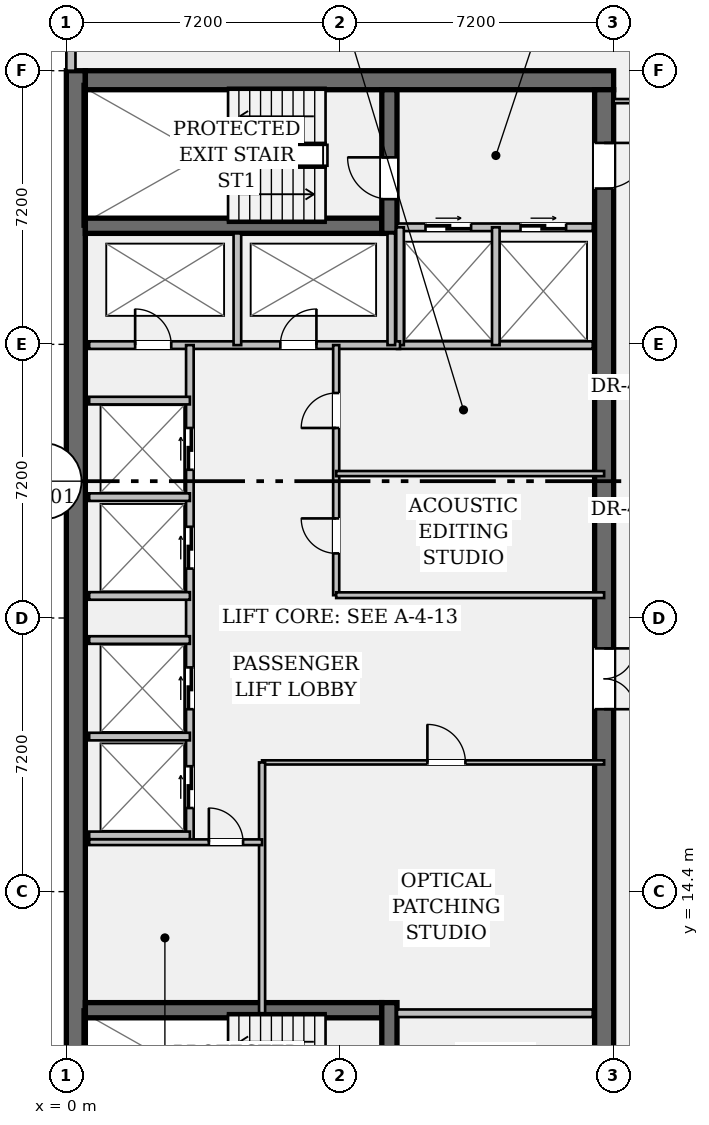
"""IFC4 building model, lengths in metres.
Left out: names, types, materials, properties, quantities, classifications, styles, units other than length and angle.
Written with IfcOpenShell. Run it as: python <this file> out.ifc"""

import sys

from ifc_helpers import new_model, si_unit, direction, frame, frame_2d, origin, place, context, subcontext, project, spatial, rectangle, extrude, element, fill, save


model = new_model("IFC4")
c1 = context("Model", 3, precision=1e-05, world=origin(), true_north=direction((0.0, 1.0)))
c2 = subcontext(c1, "Body", "Model", "MODEL_VIEW")
j1 = project(units=[si_unit("LENGTHUNIT", "METRE"), si_unit("PLANEANGLEUNIT", "RADIAN")], contexts=[c1])
p1 = place(None, origin())
s1 = spatial("IfcSite", under=j1, at=p1, CompositionType="ELEMENT")
p2 = place(p1, origin())
s2 = spatial("IfcBuilding", under=s1, at=p2, CompositionType="ELEMENT")
p3 = place(p2, frame((0.0, 0.0, 244.65)))
s3 = spatial("IfcBuildingStorey", under=s2, at=p3, CompositionType="ELEMENT", Elevation=244.65)
p4 = place(p3, frame((0.25, 7.2, 0.0), z_axis=(0.0, 0.0, 1.0), x_axis=(0.0, 1.0, 0.0)))
e1 = element("IfcWall", 1, at=p4, inside=s3, PredefinedType="SHEAR", context=c2, shape_type="SweptSolid", body=[
    extrude(rectangle(XDim=28.8, YDim=0.5, at=frame_2d((14.4, 0.0))), origin(), (0.0, 0.0, 1.0), 3.24),
])
p5 = place(p3, frame((0.5, 35.75, 0.0), z_axis=(0.0, 0.0, 1.0), x_axis=(1.0, 0.0, 0.0)))
e2 = element("IfcWall", 2, at=p5, inside=s3, PredefinedType="SHEAR", context=c2, shape_type="SweptSolid", body=[
    extrude(rectangle(XDim=13.9, YDim=0.5, at=frame_2d((6.95, 0.0))), origin(), (0.0, 0.0, 1.0), 3.24),
])
p6 = place(p3, frame((14.15, 35.5, 0.0), z_axis=(0.0, 0.0, 1.0), x_axis=(0.0, -1.0, 0.0)))
e3 = element("IfcWall", 3, at=p6, inside=s3, PredefinedType="SHEAR", context=c2, shape_type="SweptSolid", body=[
    extrude(rectangle(XDim=27.8, YDim=0.5, at=frame_2d((13.9, 0.0))), origin(), (0.0, 0.0, 1.0), 3.24),
])
p7 = place(p6, frame((1.4, 0.0, 0.0)))
e4 = element("IfcOpeningElement", 4, at=p7, cuts=e3, PredefinedType="OPENING", context=c2, shape_type="SweptSolid", body=[
    extrude(rectangle(XDim=1.2, YDim=2.15, at=frame_2d((0.6, 1.075))), frame((0.0, 0.262, 0.0), z_axis=(0.0, -1.0, 0.0), x_axis=(1.0, 0.0, 0.0)), (0.0, 0.0, 1.0), 0.524),
])
p8 = place(p6, frame((25.35, 0.0, 0.0)))
e5 = element("IfcOpeningElement", 5, at=p8, cuts=e3, PredefinedType="OPENING", context=c2, shape_type="SweptSolid", body=[
    extrude(rectangle(XDim=1.2, YDim=2.15, at=frame_2d((0.6, 1.075))), frame((0.0, 0.262, 0.0), z_axis=(0.0, -1.0, 0.0), x_axis=(1.0, 0.0, 0.0)), (0.0, 0.0, 1.0), 0.524),
])
p9 = place(p6, frame((14.7, 0.0, 0.0)))
e6 = element("IfcOpeningElement", 6, at=p9, cuts=e3, PredefinedType="OPENING", context=c2, shape_type="SweptSolid", body=[
    extrude(rectangle(XDim=1.6, YDim=2.2, at=frame_2d((0.8, 1.1))), frame((0.0, 0.262, 0.0), z_axis=(0.0, -1.0, 0.0), x_axis=(1.0, 0.0, 0.0)), (0.0, 0.0, 1.0), 0.524),
])
for number, where, z_axis, x_axis in (
    (7, (0.5, 31.92, 0.0), (0.0, 0.0, 1.0), (1.0, 0.0, 0.0)),
    (8, (0.5, 11.28, 0.0), (0.0, 0.0, 1.0), (1.0, 0.0, 0.0)),
):
    element("IfcWall", number, at=place(p3, frame(where, z_axis=z_axis, x_axis=x_axis)), inside=s3, PredefinedType="SHEAR", context=c2, shape_type="SweptSolid", body=[
        extrude(rectangle(XDim=7.8, YDim=0.4, at=frame_2d((3.9, 0.0))), origin(), (0.0, 0.0, 1.0), 3.24),
    ])
p10 = place(p3, frame((8.5, 31.72, 0.0), z_axis=(0.0, 0.0, 1.0), x_axis=(0.0, 1.0, 0.0)))
e9 = element("IfcWall", 9, at=p10, inside=s3, PredefinedType="SHEAR", context=c2, shape_type="SweptSolid", body=[
    extrude(rectangle(XDim=3.78, YDim=0.4, at=frame_2d((1.89, 0.0))), origin(), (0.0, 0.0, 1.0), 3.24),
])
p11 = place(p10, frame((0.9, 0.0, 0.0)))
e10 = element("IfcOpeningElement", 10, at=p11, cuts=e9, PredefinedType="OPENING", context=c2, shape_type="SweptSolid", body=[
    extrude(rectangle(XDim=1.1, YDim=2.15, at=frame_2d((0.55, 1.075))), frame((0.0, 0.212, 0.0), z_axis=(0.0, -1.0, 0.0), x_axis=(1.0, 0.0, 0.0)), (0.0, 0.0, 1.0), 0.424),
])
p12 = place(p3, frame((8.5, 7.7, 0.0), z_axis=(0.0, 0.0, 1.0), x_axis=(0.0, 1.0, 0.0)))
e11 = element("IfcWall", 11, at=p12, inside=s3, PredefinedType="SHEAR", context=c2, shape_type="SweptSolid", body=[
    extrude(rectangle(XDim=3.78, YDim=0.4, at=frame_2d((1.89, 0.0))), origin(), (0.0, 0.0, 1.0), 3.24),
])
p13 = place(p12, frame((0.85, 0.0, 0.0)))
e12 = element("IfcOpeningElement", 12, at=p13, cuts=e11, PredefinedType="OPENING", context=c2, shape_type="SweptSolid", body=[
    extrude(rectangle(XDim=1.1, YDim=2.15, at=frame_2d((0.55, 1.075))), frame((0.0, 0.212, 0.0), z_axis=(0.0, -1.0, 0.0), x_axis=(1.0, 0.0, 0.0)), (0.0, 0.0, 1.0), 0.424),
])
p14 = place(p3, frame((0.12, 36.0, 0.0), z_axis=(0.0, 0.0, 1.0), x_axis=(0.0, 1.0, 0.0)))
e13 = element("IfcWall", 13, at=p14, inside=s3, PredefinedType="STANDARD", context=c2, shape_type="SweptSolid", body=[
    extrude(rectangle(XDim=1.13, YDim=0.24, at=frame_2d((0.565, 0.0))), origin(), (0.0, 0.0, 1.0), 3.24),
])
p15 = place(p3, frame((8.7, 31.88, 0.0), z_axis=(0.0, 0.0, 1.0), x_axis=(1.0, 0.0, 0.0)))
e14 = element("IfcWall", 14, at=p15, inside=s3, PredefinedType="PARTITIONING", context=c2, shape_type="SweptSolid", body=[
    extrude(rectangle(XDim=5.15, YDim=0.2, at=frame_2d((2.575, 0.0))), origin(), (0.0, 0.0, 1.0), 3.24),
])
p16 = place(p15, frame((0.75, 0.0, 0.0)))
e15 = element("IfcOpeningElement", 15, at=p16, cuts=e14, PredefinedType="OPENING", context=c2, shape_type="SweptSolid", body=[
    extrude(rectangle(XDim=1.2, YDim=2.2, at=frame_2d((0.6, 1.1))), frame((0.0, 0.112, 0.0), z_axis=(0.0, -1.0, 0.0), x_axis=(1.0, 0.0, 0.0)), (0.0, 0.0, 1.0), 0.224),
])
p17 = place(p15, frame((3.25, 0.0, 0.0)))
e16 = element("IfcOpeningElement", 16, at=p17, cuts=e14, PredefinedType="OPENING", context=c2, shape_type="SweptSolid", body=[
    extrude(rectangle(XDim=1.2, YDim=2.2, at=frame_2d((0.6, 1.1))), frame((0.0, 0.112, 0.0), z_axis=(0.0, -1.0, 0.0), x_axis=(1.0, 0.0, 0.0)), (0.0, 0.0, 1.0), 0.224),
])
for number, where, z_axis, x_axis in (
    (17, (8.7, 11.2, 0.0), (0.0, 0.0, 1.0), (1.0, 0.0, 0.0)),
    (18, (8.7, 28.78, 0.0), (0.0, 0.0, 1.0), (1.0, 0.0, 0.0)),
):
    element("IfcWall", number, at=place(p3, frame(where, z_axis=z_axis, x_axis=x_axis)), inside=s3, PredefinedType="PARTITIONING", context=c2, shape_type="SweptSolid", body=[
        extrude(rectangle(XDim=5.15, YDim=0.2, at=frame_2d((2.575, 0.0))), origin(), (0.0, 0.0, 1.0), 3.24),
    ])
for number, where, z_axis, x_axis in (
    (19, (8.78, 28.78, 0.0), (0.0, 0.0, 1.0), (0.0, 1.0, 0.0)),
    (20, (11.3, 28.78, 0.0), (0.0, 0.0, 1.0), (0.0, 1.0, 0.0)),
):
    element("IfcWall", number, at=place(p3, frame(where, z_axis=z_axis, x_axis=x_axis)), inside=s3, PredefinedType="PARTITIONING", context=c2, shape_type="SweptSolid", body=[
        extrude(rectangle(XDim=3.1, YDim=0.2, at=frame_2d((1.55, 0.0))), origin(), (0.0, 0.0, 1.0), 3.24),
    ])
p18 = place(p3, frame((0.6, 28.78, 0.0), z_axis=(0.0, 0.0, 1.0), x_axis=(1.0, 0.0, 0.0)))
e21 = element("IfcWall", 21, at=p18, inside=s3, PredefinedType="PARTITIONING", context=c2, shape_type="SweptSolid", body=[
    extrude(rectangle(XDim=8.18, YDim=0.2, at=frame_2d((4.09, 0.0))), origin(), (0.0, 0.0, 1.0), 3.24),
])
p19 = place(p18, frame((1.21, 0.0, 0.0)))
e22 = element("IfcOpeningElement", 22, at=p19, cuts=e21, PredefinedType="OPENING", context=c2, shape_type="SweptSolid", body=[
    extrude(rectangle(XDim=0.95, YDim=2.15, at=frame_2d((0.475, 1.075))), frame((0.0, 0.112, 0.0), z_axis=(0.0, -1.0, 0.0), x_axis=(1.0, 0.0, 0.0)), (0.0, 0.0, 1.0), 0.224),
])
p20 = place(p18, frame((5.03, 0.0, 0.0)))
e23 = element("IfcOpeningElement", 23, at=p20, cuts=e21, PredefinedType="OPENING", context=c2, shape_type="SweptSolid", body=[
    extrude(rectangle(XDim=0.95, YDim=2.15, at=frame_2d((0.475, 1.075))), frame((0.0, 0.112, 0.0), z_axis=(0.0, -1.0, 0.0), x_axis=(1.0, 0.0, 0.0)), (0.0, 0.0, 1.0), 0.224),
])
for number, where, z_axis, x_axis in (
    (24, (4.5, 28.78, 0.0), (0.0, 0.0, 1.0), (0.0, 1.0, 0.0)),
    (25, (8.55, 28.78, 0.0), (0.0, 0.0, 1.0), (0.0, 1.0, 0.0)),
):
    element("IfcWall", number, at=place(p3, frame(where, z_axis=z_axis, x_axis=x_axis)), inside=s3, PredefinedType="PARTITIONING", context=c2, shape_type="SweptSolid", body=[
        extrude(rectangle(XDim=2.94, YDim=0.2, at=frame_2d((1.47, 0.0))), origin(), (0.0, 0.0, 1.0), 3.24),
    ])
p21 = place(p3, frame((3.25, 15.7, 0.0), z_axis=(0.0, 0.0, 1.0), x_axis=(0.0, 1.0, 0.0)))
e26 = element("IfcWall", 26, at=p21, inside=s3, PredefinedType="PARTITIONING", context=c2, shape_type="SweptSolid", body=[
    extrude(rectangle(XDim=13.08, YDim=0.2, at=frame_2d((6.54, 0.0))), origin(), (0.0, 0.0, 1.0), 3.24),
])
p22 = place(p21, frame((0.9, 0.0, 0.0)))
e27 = element("IfcOpeningElement", 27, at=p22, cuts=e26, PredefinedType="OPENING", context=c2, shape_type="SweptSolid", body=[
    extrude(rectangle(XDim=1.1, YDim=2.2, at=frame_2d((0.55, 1.1))), frame((0.0, 0.112, 0.0), z_axis=(0.0, -1.0, 0.0), x_axis=(1.0, 0.0, 0.0)), (0.0, 0.0, 1.0), 0.224),
])
p23 = place(p21, frame((3.5, 0.0, 0.0)))
e28 = element("IfcOpeningElement", 28, at=p23, cuts=e26, PredefinedType="OPENING", context=c2, shape_type="SweptSolid", body=[
    extrude(rectangle(XDim=1.1, YDim=2.2, at=frame_2d((0.55, 1.1))), frame((0.0, 0.112, 0.0), z_axis=(0.0, -1.0, 0.0), x_axis=(1.0, 0.0, 0.0)), (0.0, 0.0, 1.0), 0.224),
])
p24 = place(p21, frame((7.2, 0.0, 0.0)))
e29 = element("IfcOpeningElement", 29, at=p24, cuts=e26, PredefinedType="OPENING", context=c2, shape_type="SweptSolid", body=[
    extrude(rectangle(XDim=1.1, YDim=2.2, at=frame_2d((0.55, 1.1))), frame((0.0, 0.112, 0.0), z_axis=(0.0, -1.0, 0.0), x_axis=(1.0, 0.0, 0.0)), (0.0, 0.0, 1.0), 0.224),
])
p25 = place(p21, frame((9.8, 0.0, 0.0)))
e30 = element("IfcOpeningElement", 30, at=p25, cuts=e26, PredefinedType="OPENING", context=c2, shape_type="SweptSolid", body=[
    extrude(rectangle(XDim=1.1, YDim=2.2, at=frame_2d((0.55, 1.1))), frame((0.0, 0.112, 0.0), z_axis=(0.0, -1.0, 0.0), x_axis=(1.0, 0.0, 0.0)), (0.0, 0.0, 1.0), 0.224),
])
for number, where, z_axis, x_axis in (
    (31, (0.6, 15.88, 0.0), (0.0, 0.0, 1.0), (1.0, 0.0, 0.0)),
    (32, (0.6, 18.48, 0.0), (0.0, 0.0, 1.0), (1.0, 0.0, 0.0)),
    (33, (0.6, 22.18, 0.0), (0.0, 0.0, 1.0), (1.0, 0.0, 0.0)),
    (34, (0.6, 24.78, 0.0), (0.0, 0.0, 1.0), (1.0, 0.0, 0.0)),
    (35, (0.6, 21.02, 0.0), (0.0, 0.0, 1.0), (1.0, 0.0, 0.0)),
    (36, (0.6, 27.32, 0.0), (0.0, 0.0, 1.0), (1.0, 0.0, 0.0)),
):
    element("IfcWall", number, at=place(p3, frame(where, z_axis=z_axis, x_axis=x_axis)), inside=s3, PredefinedType="PARTITIONING", context=c2, shape_type="SweptSolid", body=[
        extrude(rectangle(XDim=2.65, YDim=0.2, at=frame_2d((1.325, 0.0))), origin(), (0.0, 0.0, 1.0), 3.24),
    ])
p26 = place(p3, frame((7.1, 22.2, 0.0), z_axis=(0.0, 0.0, 1.0), x_axis=(0.0, 1.0, 0.0)))
e37 = element("IfcWall", 37, at=p26, inside=s3, PredefinedType="PARTITIONING", context=c2, shape_type="SweptSolid", body=[
    extrude(rectangle(XDim=6.58, YDim=0.16, at=frame_2d((3.29, 0.0))), origin(), (0.0, 0.0, 1.0), 3.24),
])
p27 = place(p26, frame((1.1, 0.0, 0.0)))
e38 = element("IfcOpeningElement", 38, at=p27, cuts=e37, PredefinedType="OPENING", context=c2, shape_type="SweptSolid", body=[
    extrude(rectangle(XDim=0.92, YDim=2.15, at=frame_2d((0.46, 1.075))), frame((0.0, 0.092, 0.0), z_axis=(0.0, -1.0, 0.0), x_axis=(1.0, 0.0, 0.0)), (0.0, 0.0, 1.0), 0.184),
])
p28 = place(p26, frame((4.4, 0.0, 0.0)))
e39 = element("IfcOpeningElement", 39, at=p28, cuts=e37, PredefinedType="OPENING", context=c2, shape_type="SweptSolid", body=[
    extrude(rectangle(XDim=0.92, YDim=2.15, at=frame_2d((0.46, 1.075))), frame((0.0, 0.092, 0.0), z_axis=(0.0, -1.0, 0.0), x_axis=(1.0, 0.0, 0.0)), (0.0, 0.0, 1.0), 0.184),
])
p29 = place(p3, frame((7.1, 22.2, 0.0), z_axis=(0.0, 0.0, 1.0), x_axis=(1.0, 0.0, 0.0)))
e40 = element("IfcWall", 40, at=p29, inside=s3, PredefinedType="PARTITIONING", context=c2, shape_type="SweptSolid", body=[
    extrude(rectangle(XDim=7.05, YDim=0.15, at=frame_2d((3.525, 0.0))), origin(), (0.0, 0.0, 1.0), 3.24),
])
p30 = place(p3, frame((7.1, 25.4, 0.0), z_axis=(0.0, 0.0, 1.0), x_axis=(1.0, 0.0, 0.0)))
e41 = element("IfcWall", 41, at=p30, inside=s3, PredefinedType="PARTITIONING", context=c2, shape_type="SweptSolid", body=[
    extrude(rectangle(XDim=7.05, YDim=0.135, at=frame_2d((3.525, 0.0))), origin(), (0.0, 0.0, 1.0), 3.24),
])
p31 = place(p3, frame((5.15, 17.8, 0.0), z_axis=(0.0, 0.0, 1.0), x_axis=(1.0, 0.0, 0.0)))
e42 = element("IfcWall", 42, at=p31, inside=s3, PredefinedType="PARTITIONING", context=c2, shape_type="SweptSolid", body=[
    extrude(rectangle(XDim=9.0, YDim=0.11, at=frame_2d((4.5, 0.0))), origin(), (0.0, 0.0, 1.0), 3.24),
])
p32 = place(p31, frame((4.35, 0.0, 0.0)))
e43 = element("IfcOpeningElement", 43, at=p32, cuts=e42, PredefinedType="OPENING", context=c2, shape_type="SweptSolid", body=[
    extrude(rectangle(XDim=1.0, YDim=2.15, at=frame_2d((0.5, 1.075))), frame((0.0, 0.067, 0.0), z_axis=(0.0, -1.0, 0.0), x_axis=(1.0, 0.0, 0.0)), (0.0, 0.0, 1.0), 0.134),
])
p33 = place(p3, frame((5.15, 11.2, 0.0), z_axis=(0.0, 0.0, 1.0), x_axis=(0.0, 1.0, 0.0)))
e44 = element("IfcWall", 44, at=p33, inside=s3, PredefinedType="PARTITIONING", context=c2, shape_type="SweptSolid", body=[
    extrude(rectangle(XDim=6.6, YDim=0.16, at=frame_2d((3.3, 0.0))), origin(), (0.0, 0.0, 1.0), 3.24),
])
p34 = place(p3, frame((0.6, 15.7, 0.0), z_axis=(0.0, 0.0, 1.0), x_axis=(1.0, 0.0, 0.0)))
e45 = element("IfcWall", 45, at=p34, inside=s3, PredefinedType="PARTITIONING", context=c2, shape_type="SweptSolid", body=[
    extrude(rectangle(XDim=4.55, YDim=0.15, at=frame_2d((2.275, 0.0))), origin(), (0.0, 0.0, 1.0), 3.24),
])
p35 = place(p34, frame((3.15, 0.0, 0.0)))
e46 = element("IfcOpeningElement", 46, at=p35, cuts=e45, PredefinedType="OPENING", context=c2, shape_type="SweptSolid", body=[
    extrude(rectangle(XDim=0.9, YDim=2.15, at=frame_2d((0.45, 1.075))), frame((0.0, 0.087, 0.0), z_axis=(0.0, -1.0, 0.0), x_axis=(1.0, 0.0, 0.0)), (0.0, 0.0, 1.0), 0.174),
])
p36 = place(p3, frame((14.4, 35.2, 0.0), z_axis=(0.0, 0.0, 1.0), x_axis=(1.0, 0.0, 0.0)))
e47 = element("IfcWall", 47, at=p36, inside=s3, PredefinedType="PARTITIONING", context=c2, shape_type="SweptSolid", body=[
    extrude(rectangle(XDim=2.95, YDim=0.11, at=frame_2d((1.475, 0.0))), origin(), (0.0, 0.0, 1.0), 2.808),
])
p37 = place(p36, frame((0.95, 0.0, 0.0)))
e48 = element("IfcOpeningElement", 48, at=p37, cuts=e47, PredefinedType="OPENING", context=c2, shape_type="SweptSolid", body=[
    extrude(rectangle(XDim=1.0, YDim=2.15, at=frame_2d((0.5, 1.075))), frame((0.0, 0.067, 0.0), z_axis=(0.0, -1.0, 0.0), x_axis=(1.0, 0.0, 0.0)), (0.0, 0.0, 1.0), 0.134),
])
p38 = place(p11, origin())
e49 = element("IfcDoor", 49, at=p38, inside=s3, OperationType="SINGLE_SWING_RIGHT", PredefinedType="DOOR", context=c2, shape_type="SweptSolid", body=[
    extrude(rectangle(XDim=1.1, YDim=2.15, at=frame_2d((0.55, 1.075))), frame((0.0, 0.025, 0.0), z_axis=(0.0, -1.0, 0.0), x_axis=(1.0, 0.0, 0.0)), (0.0, 0.0, 1.0), 0.05),
])
fill(e10, e49)
p39 = place(p7, origin())
e50 = element("IfcDoor", 50, at=p39, inside=s3, OperationType="SINGLE_SWING_LEFT", PredefinedType="DOOR", context=c2, shape_type="SweptSolid", body=[
    extrude(rectangle(XDim=1.2, YDim=2.15, at=frame_2d((0.6, 1.075))), frame((0.0, 0.025, 0.0), z_axis=(0.0, -1.0, 0.0), x_axis=(1.0, 0.0, 0.0)), (0.0, 0.0, 1.0), 0.05),
])
fill(e4, e50)
p40 = place(p16, origin())
e51 = element("IfcDoor", 51, at=p40, inside=s3, OperationType="DOUBLE_DOOR_SLIDING", PredefinedType="DOOR", context=c2, shape_type="SweptSolid", body=[
    extrude(rectangle(XDim=1.2, YDim=2.2, at=frame_2d((0.6, 1.1))), frame((0.0, 0.025, 0.0), z_axis=(0.0, -1.0, 0.0), x_axis=(1.0, 0.0, 0.0)), (0.0, 0.0, 1.0), 0.05),
])
fill(e15, e51)
p41 = place(p17, origin())
e52 = element("IfcDoor", 52, at=p41, inside=s3, OperationType="DOUBLE_DOOR_SLIDING", PredefinedType="DOOR", context=c2, shape_type="SweptSolid", body=[
    extrude(rectangle(XDim=1.2, YDim=2.2, at=frame_2d((0.6, 1.1))), frame((0.0, 0.025, 0.0), z_axis=(0.0, -1.0, 0.0), x_axis=(1.0, 0.0, 0.0)), (0.0, 0.0, 1.0), 0.05),
])
fill(e16, e52)
p42 = place(p19, origin())
e53 = element("IfcDoor", 53, at=p42, inside=s3, OperationType="SINGLE_SWING_LEFT", PredefinedType="DOOR", context=c2, shape_type="SweptSolid", body=[
    extrude(rectangle(XDim=0.95, YDim=2.15, at=frame_2d((0.475, 1.075))), frame((0.0, 0.025, 0.0), z_axis=(0.0, -1.0, 0.0), x_axis=(1.0, 0.0, 0.0)), (0.0, 0.0, 1.0), 0.05),
])
fill(e22, e53)
p43 = place(p20, origin())
e54 = element("IfcDoor", 54, at=p43, inside=s3, OperationType="SINGLE_SWING_RIGHT", PredefinedType="DOOR", context=c2, shape_type="SweptSolid", body=[
    extrude(rectangle(XDim=0.95, YDim=2.15, at=frame_2d((0.475, 1.075))), frame((0.0, 0.025, 0.0), z_axis=(0.0, -1.0, 0.0), x_axis=(1.0, 0.0, 0.0)), (0.0, 0.0, 1.0), 0.05),
])
fill(e23, e54)
p44 = place(p9, origin())
e55 = element("IfcDoor", 55, at=p44, inside=s3, OperationType="DOUBLE_DOOR_SINGLE_SWING", PredefinedType="DOOR", context=c2, shape_type="SweptSolid", body=[
    extrude(rectangle(XDim=1.6, YDim=2.2, at=frame_2d((0.8, 1.1))), frame((0.0, 0.025, 0.0), z_axis=(0.0, -1.0, 0.0), x_axis=(1.0, 0.0, 0.0)), (0.0, 0.0, 1.0), 0.05),
])
fill(e6, e55)
p45 = place(p22, origin())
e56 = element("IfcDoor", 56, at=p45, inside=s3, OperationType="DOUBLE_DOOR_SLIDING", PredefinedType="DOOR", context=c2, shape_type="SweptSolid", body=[
    extrude(rectangle(XDim=1.1, YDim=2.2, at=frame_2d((0.55, 1.1))), frame((0.0, 0.025, 0.0), z_axis=(0.0, -1.0, 0.0), x_axis=(1.0, 0.0, 0.0)), (0.0, 0.0, 1.0), 0.05),
])
fill(e27, e56)
p46 = place(p23, origin())
e57 = element("IfcDoor", 57, at=p46, inside=s3, OperationType="DOUBLE_DOOR_SLIDING", PredefinedType="DOOR", context=c2, shape_type="SweptSolid", body=[
    extrude(rectangle(XDim=1.1, YDim=2.2, at=frame_2d((0.55, 1.1))), frame((0.0, 0.025, 0.0), z_axis=(0.0, -1.0, 0.0), x_axis=(1.0, 0.0, 0.0)), (0.0, 0.0, 1.0), 0.05),
])
fill(e28, e57)
p47 = place(p24, origin())
e58 = element("IfcDoor", 58, at=p47, inside=s3, OperationType="DOUBLE_DOOR_SLIDING", PredefinedType="DOOR", context=c2, shape_type="SweptSolid", body=[
    extrude(rectangle(XDim=1.1, YDim=2.2, at=frame_2d((0.55, 1.1))), frame((0.0, 0.025, 0.0), z_axis=(0.0, -1.0, 0.0), x_axis=(1.0, 0.0, 0.0)), (0.0, 0.0, 1.0), 0.05),
])
fill(e29, e58)
p48 = place(p25, origin())
e59 = element("IfcDoor", 59, at=p48, inside=s3, OperationType="DOUBLE_DOOR_SLIDING", PredefinedType="DOOR", context=c2, shape_type="SweptSolid", body=[
    extrude(rectangle(XDim=1.1, YDim=2.2, at=frame_2d((0.55, 1.1))), frame((0.0, 0.025, 0.0), z_axis=(0.0, -1.0, 0.0), x_axis=(1.0, 0.0, 0.0)), (0.0, 0.0, 1.0), 0.05),
])
fill(e30, e59)
p49 = place(p27, origin())
e60 = element("IfcDoor", 60, at=p49, inside=s3, OperationType="SINGLE_SWING_RIGHT", PredefinedType="DOOR", context=c2, shape_type="SweptSolid", body=[
    extrude(rectangle(XDim=0.92, YDim=2.15, at=frame_2d((0.46, 1.075))), frame((0.0, 0.025, 0.0), z_axis=(0.0, -1.0, 0.0), x_axis=(1.0, 0.0, 0.0)), (0.0, 0.0, 1.0), 0.05),
])
fill(e38, e60)
p50 = place(p28, origin())
e61 = element("IfcDoor", 61, at=p50, inside=s3, OperationType="SINGLE_SWING_LEFT", PredefinedType="DOOR", context=c2, shape_type="SweptSolid", body=[
    extrude(rectangle(XDim=0.92, YDim=2.15, at=frame_2d((0.46, 1.075))), frame((0.0, 0.025, 0.0), z_axis=(0.0, -1.0, 0.0), x_axis=(1.0, 0.0, 0.0)), (0.0, 0.0, 1.0), 0.05),
])
fill(e39, e61)
p51 = place(p32, origin())
e62 = element("IfcDoor", 62, at=p51, inside=s3, OperationType="SINGLE_SWING_LEFT", PredefinedType="DOOR", context=c2, shape_type="SweptSolid", body=[
    extrude(rectangle(XDim=1.0, YDim=2.15, at=frame_2d((0.5, 1.075))), frame((0.0, 0.025, 0.0), z_axis=(0.0, -1.0, 0.0), x_axis=(1.0, 0.0, 0.0)), (0.0, 0.0, 1.0), 0.05),
])
fill(e43, e62)
p52 = place(p35, origin())
e63 = element("IfcDoor", 63, at=p52, inside=s3, OperationType="SINGLE_SWING_LEFT", PredefinedType="DOOR", context=c2, shape_type="SweptSolid", body=[
    extrude(rectangle(XDim=0.9, YDim=2.15, at=frame_2d((0.45, 1.075))), frame((0.0, 0.025, 0.0), z_axis=(0.0, -1.0, 0.0), x_axis=(1.0, 0.0, 0.0)), (0.0, 0.0, 1.0), 0.05),
])
fill(e46, e63)
save(model, sys.argv[1])
